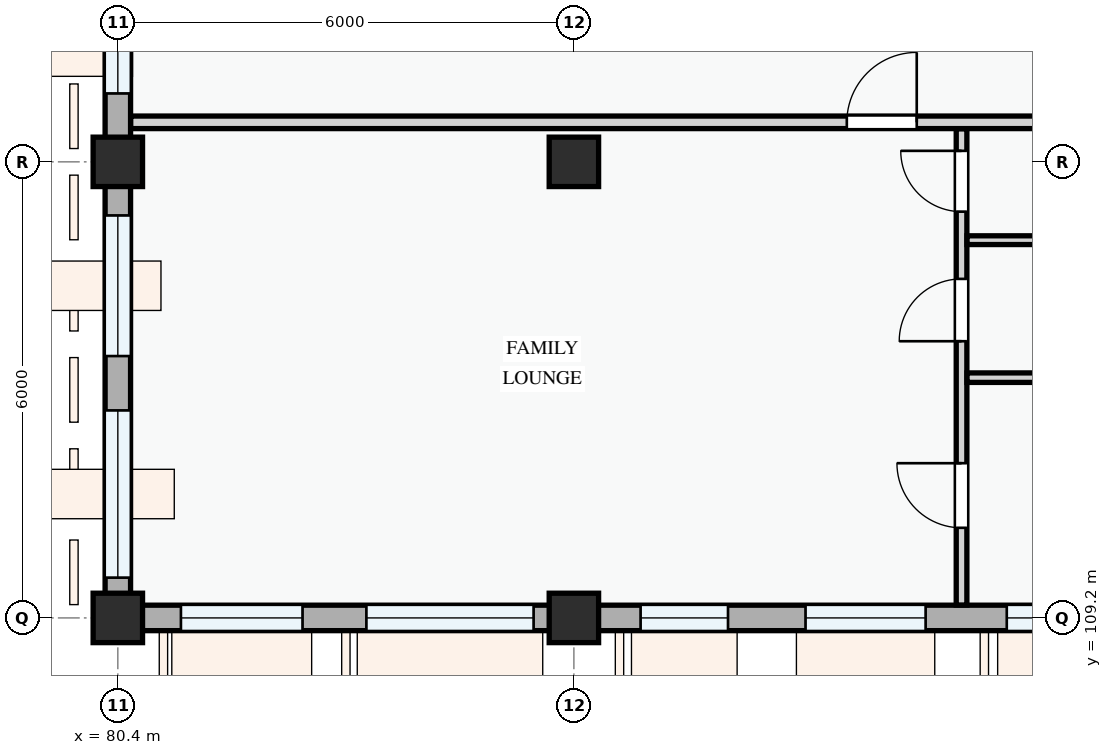
"""IFC4 building model, lengths in metres.
Left out: names, types, materials, properties, quantities, classifications, styles, units other than length and angle.
Written with IfcOpenShell. Run it as: python <this file> out.ifc"""

import sys

from ifc_helpers import new_model, si_unit, direction, frame, frame_2d, origin, origin_2d, place, context, subcontext, project, spatial, rectangle, extrude, element, fill, save


model = new_model("IFC4")
c1 = context("Model", 3, precision=1e-05, world=origin(), true_north=direction((0.0, 1.0)))
c2 = subcontext(c1, "Body", "Model", "MODEL_VIEW")
j1 = project(units=[si_unit("LENGTHUNIT", "METRE"), si_unit("PLANEANGLEUNIT", "RADIAN")], contexts=[c1])
p1 = place(None, origin())
s1 = spatial("IfcSite", under=j1, at=p1, CompositionType="ELEMENT")
p2 = place(p1, origin())
s2 = spatial("IfcBuilding", under=s1, at=p2, CompositionType="ELEMENT")
p3 = place(p2, frame((0.0, 0.0, 14.7)))
s3 = spatial("IfcBuildingStorey", under=s2, at=p3, CompositionType="ELEMENT", Elevation=14.7)
for number, where, z_axis, x_axis in (
    (1, (80.4, 109.2, 0.0), (0.0, 0.0, 1.0), (1.0, 0.0, 0.0)),
    (2, (80.4, 115.2, 0.0), (0.0, 0.0, 1.0), (1.0, 0.0, 0.0)),
    (3, (86.4, 109.2, 0.0), (0.0, 0.0, 1.0), (1.0, 0.0, 0.0)),
    (4, (86.4, 115.2, 0.0), (0.0, 0.0, 1.0), (1.0, 0.0, 0.0)),
):
    element("IfcColumn", number, at=place(p3, frame(where, z_axis=z_axis, x_axis=x_axis)), inside=s3, PredefinedType="COLUMN", context=c2, shape_type="SweptSolid", body=[
        extrude(rectangle(XDim=0.65, YDim=0.65, at=origin_2d()), origin(), (0.0, 0.0, 1.0), 3.3),
    ])
p4 = place(p3, frame((80.4, 123.6, 0.0), z_axis=(0.0, 0.0, 1.0), x_axis=(0.0, -1.0, 0.0)))
e5 = element("IfcWall", 5, at=p4, inside=s3, PredefinedType="STANDARD", context=c2, shape_type="SweptSolid", body=[
    extrude(rectangle(XDim=8.4, YDim=0.335, at=frame_2d((4.2, 0.0))), origin(), (0.0, 0.0, 1.0), 2.425),
])
p5 = place(p4, frame((0.692, 0.0, 0.78)))
e6 = element("IfcOpeningElement", 6, at=p5, cuts=e5, PredefinedType="OPENING", context=c2, shape_type="SweptSolid", body=[
    extrude(rectangle(XDim=1.98, YDim=1.5, at=frame_2d((0.99, 0.75))), frame((0.0, 0.177, 0.0), z_axis=(0.0, -1.0, 0.0), x_axis=(1.0, 0.0, 0.0)), (0.0, 0.0, 1.0), 0.355),
])
p6 = place(p4, frame((3.367, 0.0, 0.78)))
e7 = element("IfcOpeningElement", 7, at=p6, cuts=e5, PredefinedType="OPENING", context=c2, shape_type="SweptSolid", body=[
    extrude(rectangle(XDim=2.32, YDim=1.5, at=frame_2d((1.16, 0.75))), frame((0.0, 0.177, 0.0), z_axis=(0.0, -1.0, 0.0), x_axis=(1.0, 0.0, 0.0)), (0.0, 0.0, 1.0), 0.355),
])
p7 = place(p4, frame((6.4, 0.0, 0.78)))
e8 = element("IfcOpeningElement", 8, at=p7, cuts=e5, PredefinedType="OPENING", context=c2, shape_type="SweptSolid", body=[
    extrude(rectangle(XDim=1.1, YDim=1.3, at=frame_2d((0.55, 0.65))), frame((0.0, 0.177, 0.0), z_axis=(0.0, -1.0, 0.0), x_axis=(1.0, 0.0, 0.0)), (0.0, 0.0, 1.0), 0.355),
])
p8 = place(p3, frame((80.4, 115.2, 0.0), z_axis=(0.0, 0.0, 1.0), x_axis=(0.0, -1.0, 0.0)))
e9 = element("IfcWall", 9, at=p8, inside=s3, PredefinedType="STANDARD", context=c2, shape_type="SweptSolid", body=[
    extrude(rectangle(XDim=6.0, YDim=0.335, at=frame_2d((3.0, 0.0))), origin(), (0.0, 0.0, 1.0), 2.575),
])
p9 = place(p8, frame((0.705, 0.0, 0.78)))
e10 = element("IfcOpeningElement", 10, at=p9, cuts=e9, PredefinedType="OPENING", context=c2, shape_type="SweptSolid", body=[
    extrude(rectangle(XDim=1.85, YDim=1.6, at=frame_2d((0.925, 0.8))), frame((0.0, 0.177, 0.0), z_axis=(0.0, -1.0, 0.0), x_axis=(1.0, 0.0, 0.0)), (0.0, 0.0, 1.0), 0.355),
])
p10 = place(p8, frame((3.27, 0.0, 0.78)))
e11 = element("IfcOpeningElement", 11, at=p10, cuts=e9, PredefinedType="OPENING", context=c2, shape_type="SweptSolid", body=[
    extrude(rectangle(XDim=2.2, YDim=1.5, at=frame_2d((1.1, 0.75))), frame((0.0, 0.177, 0.0), z_axis=(0.0, -1.0, 0.0), x_axis=(1.0, 0.0, 0.0)), (0.0, 0.0, 1.0), 0.355),
])
p11 = place(p3, frame((80.4, 109.2, 0.0), z_axis=(0.0, 0.0, 1.0), x_axis=(1.0, 0.0, 0.0)))
e12 = element("IfcWall", 12, at=p11, inside=s3, PredefinedType="STANDARD", context=c2, shape_type="SweptSolid", body=[
    extrude(rectangle(XDim=6.0, YDim=0.335, at=frame_2d((3.0, 0.0))), origin(), (0.0, 0.0, 1.0), 2.475),
])
p12 = place(p11, frame((0.83, 0.0, 0.78)))
e13 = element("IfcOpeningElement", 13, at=p12, cuts=e12, PredefinedType="OPENING", context=c2, shape_type="SweptSolid", body=[
    extrude(rectangle(XDim=1.6, YDim=1.55, at=frame_2d((0.8, 0.775))), frame((0.0, 0.177, 0.0), z_axis=(0.0, -1.0, 0.0), x_axis=(1.0, 0.0, 0.0)), (0.0, 0.0, 1.0), 0.355),
])
p13 = place(p11, frame((3.27, 0.0, 0.78)))
e14 = element("IfcOpeningElement", 14, at=p13, cuts=e12, PredefinedType="OPENING", context=c2, shape_type="SweptSolid", body=[
    extrude(rectangle(XDim=2.2, YDim=1.5, at=frame_2d((1.1, 0.75))), frame((0.0, 0.177, 0.0), z_axis=(0.0, -1.0, 0.0), x_axis=(1.0, 0.0, 0.0)), (0.0, 0.0, 1.0), 0.355),
])
p14 = place(p3, frame((86.4, 109.2, 0.0), z_axis=(0.0, 0.0, 1.0), x_axis=(1.0, 0.0, 0.0)))
e15 = element("IfcWall", 15, at=p14, inside=s3, PredefinedType="STANDARD", context=c2, shape_type="SweptSolid", body=[
    extrude(rectangle(XDim=8.4, YDim=0.335, at=frame_2d((4.2, 0.0))), origin(), (0.0, 0.0, 1.0), 2.375),
])
p15 = place(p14, frame((0.877, 0.0, 0.78)))
e16 = element("IfcOpeningElement", 16, at=p15, cuts=e15, PredefinedType="OPENING", context=c2, shape_type="SweptSolid", body=[
    extrude(rectangle(XDim=1.15, YDim=1.25, at=frame_2d((0.575, 0.625))), frame((0.0, 0.177, 0.0), z_axis=(0.0, -1.0, 0.0), x_axis=(1.0, 0.0, 0.0)), (0.0, 0.0, 1.0), 0.355),
])
p16 = place(p14, frame((3.048, 0.0, 0.78)))
e17 = element("IfcOpeningElement", 17, at=p16, cuts=e15, PredefinedType="OPENING", context=c2, shape_type="SweptSolid", body=[
    extrude(rectangle(XDim=1.58, YDim=1.48, at=frame_2d((0.79, 0.74))), frame((0.0, 0.177, 0.0), z_axis=(0.0, -1.0, 0.0), x_axis=(1.0, 0.0, 0.0)), (0.0, 0.0, 1.0), 0.355),
])
p17 = place(p14, frame((5.695, 0.0, 0.78)))
e18 = element("IfcOpeningElement", 18, at=p17, cuts=e15, PredefinedType="OPENING", context=c2, shape_type="SweptSolid", body=[
    extrude(rectangle(XDim=1.92, YDim=1.44, at=frame_2d((0.96, 0.72))), frame((0.0, 0.177, 0.0), z_axis=(0.0, -1.0, 0.0), x_axis=(1.0, 0.0, 0.0)), (0.0, 0.0, 1.0), 0.355),
])
p18 = place(p3, frame((91.5, 109.369, 0.0), z_axis=(0.0, 0.0, 1.0), x_axis=(0.0, 1.0, 0.0)))
e19 = element("IfcWall", 19, at=p18, inside=s3, PredefinedType="PARTITIONING", context=c2, shape_type="SweptSolid", body=[
    extrude(rectangle(XDim=6.266, YDim=0.14, at=frame_2d((3.133, 0.0))), origin(), (0.0, 0.0, 1.0), 3.0),
])
p19 = place(p18, frame((1.016, 0.0, 0.0)))
e20 = element("IfcOpeningElement", 20, at=p19, cuts=e19, PredefinedType="OPENING", context=c2, shape_type="SweptSolid", body=[
    extrude(rectangle(XDim=0.85, YDim=2.1, at=frame_2d((0.425, 1.05))), frame((0.0, 0.08, 0.0), z_axis=(0.0, -1.0, 0.0), x_axis=(1.0, 0.0, 0.0)), (0.0, 0.0, 1.0), 0.16),
])
p20 = place(p18, frame((3.471, 0.0, 0.0)))
e21 = element("IfcOpeningElement", 21, at=p20, cuts=e19, PredefinedType="OPENING", context=c2, shape_type="SweptSolid", body=[
    extrude(rectangle(XDim=0.82, YDim=2.08, at=frame_2d((0.41, 1.04))), frame((0.0, 0.08, 0.0), z_axis=(0.0, -1.0, 0.0), x_axis=(1.0, 0.0, 0.0)), (0.0, 0.0, 1.0), 0.16),
])
p21 = place(p18, frame((5.175, 0.0, 0.0)))
e22 = element("IfcOpeningElement", 22, at=p21, cuts=e19, PredefinedType="OPENING", context=c2, shape_type="SweptSolid", body=[
    extrude(rectangle(XDim=0.8, YDim=2.1, at=frame_2d((0.4, 1.05))), frame((0.0, 0.08, 0.0), z_axis=(0.0, -1.0, 0.0), x_axis=(1.0, 0.0, 0.0)), (0.0, 0.0, 1.0), 0.16),
])
p22 = place(p3, frame((91.572, 112.361, 0.0), z_axis=(0.0, 0.0, 1.0), x_axis=(1.0, 0.0, 0.0)))
e23 = element("IfcWall", 23, at=p22, inside=s3, PredefinedType="PARTITIONING", context=c2, shape_type="SweptSolid", body=[
    extrude(rectangle(XDim=10.856, YDim=0.125, at=frame_2d((5.428, 0.0))), origin(), (0.0, 0.0, 1.0), 3.0),
])
p23 = place(p3, frame((91.572, 114.17, 0.0), z_axis=(0.0, 0.0, 1.0), x_axis=(1.0, 0.0, 0.0)))
e24 = element("IfcWall", 24, at=p23, inside=s3, PredefinedType="PARTITIONING", context=c2, shape_type="SweptSolid", body=[
    extrude(rectangle(XDim=10.856, YDim=0.115, at=frame_2d((5.428, 0.0))), origin(), (0.0, 0.0, 1.0), 3.0),
])
p24 = place(p3, frame((80.57, 115.72, 0.0), z_axis=(0.0, 0.0, 1.0), x_axis=(1.0, 0.0, 0.0)))
e25 = element("IfcWall", 25, at=p24, inside=s3, PredefinedType="PARTITIONING", context=c2, shape_type="SweptSolid", body=[
    extrude(rectangle(XDim=69.48, YDim=0.165, at=frame_2d((34.74, 0.0))), origin(), (0.0, 0.0, 1.0), 3.0),
])
p25 = place(p24, frame((9.421, 0.0, 0.0)))
e26 = element("IfcOpeningElement", 26, at=p25, cuts=e25, PredefinedType="OPENING", context=c2, shape_type="SweptSolid", body=[
    extrude(rectangle(XDim=0.92, YDim=2.1, at=frame_2d((0.46, 1.05))), frame((0.0, 0.093, 0.0), z_axis=(0.0, -1.0, 0.0), x_axis=(1.0, 0.0, 0.0)), (0.0, 0.0, 1.0), 0.185),
])
p26 = place(p24, frame((23.996, 0.0, 0.0)))
e27 = element("IfcOpeningElement", 27, at=p26, cuts=e25, PredefinedType="OPENING", context=c2, shape_type="SweptSolid", body=[
    extrude(rectangle(XDim=0.92, YDim=2.1, at=frame_2d((0.46, 1.05))), frame((0.0, 0.093, 0.0), z_axis=(0.0, -1.0, 0.0), x_axis=(1.0, 0.0, 0.0)), (0.0, 0.0, 1.0), 0.185),
])
p27 = place(p24, frame((52.69, 0.0, 0.0)))
e28 = element("IfcOpeningElement", 28, at=p27, cuts=e25, PredefinedType="OPENING", context=c2, shape_type="SweptSolid", body=[
    extrude(rectangle(XDim=0.92, YDim=2.1, at=frame_2d((0.46, 1.05))), frame((0.0, 0.093, 0.0), z_axis=(0.0, -1.0, 0.0), x_axis=(1.0, 0.0, 0.0)), (0.0, 0.0, 1.0), 0.185),
])
p28 = place(p7, origin())
e29 = element("IfcWindow", 29, at=p28, inside=s3, PartitioningType="SINGLE_PANEL", PredefinedType="WINDOW", context=c2, shape_type="SweptSolid", body=[
    extrude(rectangle(XDim=1.1, YDim=1.3, at=frame_2d((0.55, 0.65))), frame((0.0, 0.03, 0.0), z_axis=(0.0, -1.0, 0.0), x_axis=(1.0, 0.0, 0.0)), (0.0, 0.0, 1.0), 0.06),
])
fill(e8, e29)
p29 = place(p9, origin())
e30 = element("IfcWindow", 30, at=p29, inside=s3, PartitioningType="DOUBLE_PANEL_VERTICAL", PredefinedType="WINDOW", context=c2, shape_type="SweptSolid", body=[
    extrude(rectangle(XDim=1.85, YDim=1.6, at=frame_2d((0.925, 0.8))), frame((0.0, 0.03, 0.0), z_axis=(0.0, -1.0, 0.0), x_axis=(1.0, 0.0, 0.0)), (0.0, 0.0, 1.0), 0.06),
])
fill(e10, e30)
p30 = place(p10, origin())
e31 = element("IfcWindow", 31, at=p30, inside=s3, PartitioningType="DOUBLE_PANEL_VERTICAL", PredefinedType="WINDOW", context=c2, shape_type="SweptSolid", body=[
    extrude(rectangle(XDim=2.2, YDim=1.5, at=frame_2d((1.1, 0.75))), frame((0.0, 0.03, 0.0), z_axis=(0.0, -1.0, 0.0), x_axis=(1.0, 0.0, 0.0)), (0.0, 0.0, 1.0), 0.06),
])
fill(e11, e31)
p31 = place(p12, origin())
e32 = element("IfcWindow", 32, at=p31, inside=s3, PartitioningType="DOUBLE_PANEL_VERTICAL", PredefinedType="WINDOW", context=c2, shape_type="SweptSolid", body=[
    extrude(rectangle(XDim=1.6, YDim=1.55, at=frame_2d((0.8, 0.775))), frame((0.0, 0.03, 0.0), z_axis=(0.0, -1.0, 0.0), x_axis=(1.0, 0.0, 0.0)), (0.0, 0.0, 1.0), 0.06),
])
fill(e13, e32)
p32 = place(p13, origin())
e33 = element("IfcWindow", 33, at=p32, inside=s3, PartitioningType="DOUBLE_PANEL_VERTICAL", PredefinedType="WINDOW", context=c2, shape_type="SweptSolid", body=[
    extrude(rectangle(XDim=2.2, YDim=1.5, at=frame_2d((1.1, 0.75))), frame((0.0, 0.03, 0.0), z_axis=(0.0, -1.0, 0.0), x_axis=(1.0, 0.0, 0.0)), (0.0, 0.0, 1.0), 0.06),
])
fill(e14, e33)
p33 = place(p15, origin())
e34 = element("IfcWindow", 34, at=p33, inside=s3, PartitioningType="SINGLE_PANEL", PredefinedType="WINDOW", context=c2, shape_type="SweptSolid", body=[
    extrude(rectangle(XDim=1.15, YDim=1.25, at=frame_2d((0.575, 0.625))), frame((0.0, 0.03, 0.0), z_axis=(0.0, -1.0, 0.0), x_axis=(1.0, 0.0, 0.0)), (0.0, 0.0, 1.0), 0.06),
])
fill(e16, e34)
p34 = place(p16, origin())
e35 = element("IfcWindow", 35, at=p34, inside=s3, PartitioningType="SINGLE_PANEL", PredefinedType="WINDOW", context=c2, shape_type="SweptSolid", body=[
    extrude(rectangle(XDim=1.58, YDim=1.48, at=frame_2d((0.79, 0.74))), frame((0.0, 0.03, 0.0), z_axis=(0.0, -1.0, 0.0), x_axis=(1.0, 0.0, 0.0)), (0.0, 0.0, 1.0), 0.06),
])
fill(e17, e35)
p35 = place(p17, origin())
e36 = element("IfcWindow", 36, at=p35, inside=s3, PartitioningType="DOUBLE_PANEL_VERTICAL", PredefinedType="WINDOW", context=c2, shape_type="SweptSolid", body=[
    extrude(rectangle(XDim=1.92, YDim=1.44, at=frame_2d((0.96, 0.72))), frame((0.0, 0.03, 0.0), z_axis=(0.0, -1.0, 0.0), x_axis=(1.0, 0.0, 0.0)), (0.0, 0.0, 1.0), 0.06),
])
fill(e18, e36)
p36 = place(p19, origin())
e37 = element("IfcDoor", 37, at=p36, inside=s3, OperationType="SINGLE_SWING_RIGHT", PredefinedType="DOOR", context=c2, shape_type="SweptSolid", body=[
    extrude(rectangle(XDim=0.85, YDim=2.1, at=frame_2d((0.425, 1.05))), frame((0.0, 0.025, 0.0), z_axis=(0.0, -1.0, 0.0), x_axis=(1.0, 0.0, 0.0)), (0.0, 0.0, 1.0), 0.05),
])
fill(e20, e37)
p37 = place(p20, origin())
e38 = element("IfcDoor", 38, at=p37, inside=s3, OperationType="SINGLE_SWING_LEFT", PredefinedType="DOOR", context=c2, shape_type="SweptSolid", body=[
    extrude(rectangle(XDim=0.82, YDim=2.08, at=frame_2d((0.41, 1.04))), frame((0.0, 0.025, 0.0), z_axis=(0.0, -1.0, 0.0), x_axis=(1.0, 0.0, 0.0)), (0.0, 0.0, 1.0), 0.05),
])
fill(e21, e38)
p38 = place(p21, origin())
e39 = element("IfcDoor", 39, at=p38, inside=s3, OperationType="SINGLE_SWING_RIGHT", PredefinedType="DOOR", context=c2, shape_type="SweptSolid", body=[
    extrude(rectangle(XDim=0.8, YDim=2.1, at=frame_2d((0.4, 1.05))), frame((0.0, 0.025, 0.0), z_axis=(0.0, -1.0, 0.0), x_axis=(1.0, 0.0, 0.0)), (0.0, 0.0, 1.0), 0.05),
])
fill(e22, e39)
p39 = place(p25, origin())
e40 = element("IfcDoor", 40, at=p39, inside=s3, OperationType="SINGLE_SWING_RIGHT", PredefinedType="DOOR", context=c2, shape_type="SweptSolid", body=[
    extrude(rectangle(XDim=0.92, YDim=2.1, at=frame_2d((0.46, 1.05))), frame((0.0, 0.025, 0.0), z_axis=(0.0, -1.0, 0.0), x_axis=(1.0, 0.0, 0.0)), (0.0, 0.0, 1.0), 0.05),
])
fill(e26, e40)
save(model, sys.argv[1])
